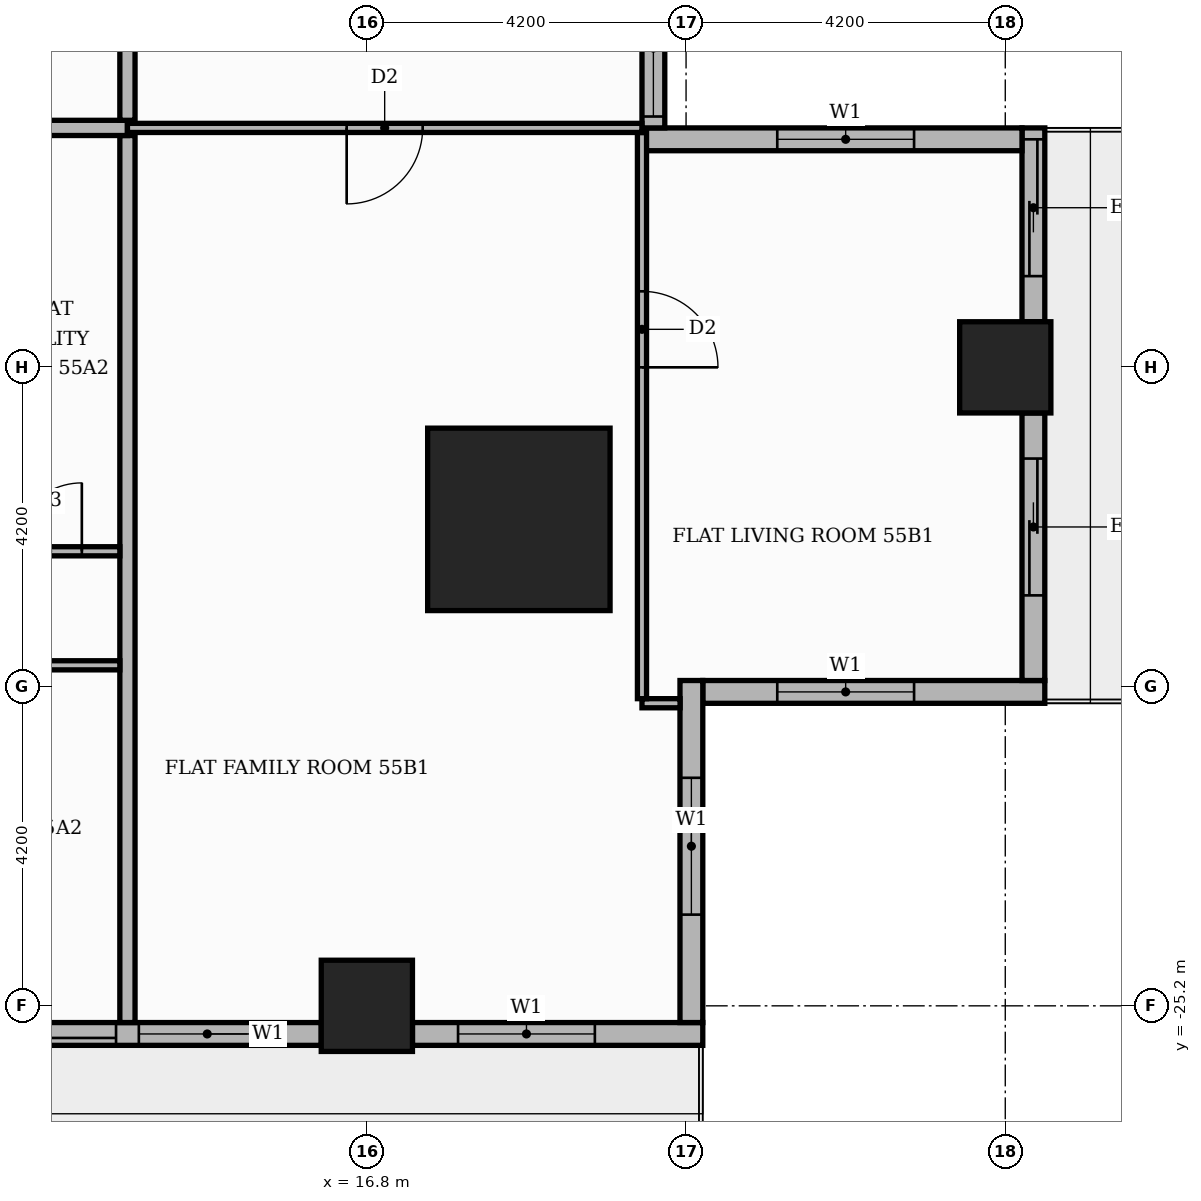
"""IFC4 building model, lengths in metres.
Left out: names, types, materials, properties, quantities, classifications, styles, units other than length and angle.
Written with IfcOpenShell. Run it as: python <this file> out.ifc"""

import sys

from ifc_helpers import new_model, si_unit, direction, frame, frame_2d, origin, origin_2d, place, context, subcontext, project, spatial, rectangle, extrude, element, fill, save


model = new_model("IFC4")
c1 = context("Model", 3, precision=1e-05, world=origin(), true_north=direction((0.0, 1.0)))
c2 = subcontext(c1, "Body", "Model", "MODEL_VIEW")
j1 = project(units=[si_unit("LENGTHUNIT", "METRE"), si_unit("PLANEANGLEUNIT", "RADIAN")], contexts=[c1])
p1 = place(None, origin())
s1 = spatial("IfcSite", under=j1, at=p1, CompositionType="ELEMENT")
p2 = place(p1, origin())
s2 = spatial("IfcBuilding", under=s1, at=p2, CompositionType="ELEMENT")
p3 = place(p2, frame((0.0, 0.0, 231.3)))
s3 = spatial("IfcBuildingStorey", under=s2, at=p3, CompositionType="ELEMENT", Elevation=231.3)
p4 = place(p3, frame((18.8, -18.8, 0.0), z_axis=(0.0, 0.0, 1.0), x_axis=(1.0, 0.0, 0.0)))
e1 = element("IfcColumn", 1, at=p4, inside=s3, PredefinedType="COLUMN", context=c2, shape_type="SweptSolid", body=[
    extrude(rectangle(XDim=2.4, YDim=2.4, at=origin_2d()), origin(), (0.0, 0.0, 1.0), 3.9),
])
for number, where, z_axis, x_axis in (
    (2, (25.2, -16.8, 0.0), (0.0, 0.0, 1.0), (1.0, 0.0, 0.0)),
    (3, (16.8, -25.2, 0.0), (0.0, 0.0, 1.0), (1.0, 0.0, 0.0)),
):
    element("IfcColumn", number, at=place(p3, frame(where, z_axis=z_axis, x_axis=x_axis)), inside=s3, PredefinedType="COLUMN", context=c2, shape_type="SweptSolid", body=[
        extrude(rectangle(XDim=1.2, YDim=1.2, at=origin_2d()), origin(), (0.0, 0.0, 1.0), 3.9),
    ])
p5 = place(p3, frame((21.22, -21.07, 0.0), z_axis=(0.0, 0.0, 1.0), x_axis=(1.0, 0.0, 0.0)))
e4 = element("IfcWall", 4, at=p5, inside=s3, PredefinedType="STANDARD", context=c2, shape_type="SweptSolid", body=[
    extrude(rectangle(XDim=4.5, YDim=0.3, at=frame_2d((2.25, 0.0))), origin(), (0.0, 0.0, 1.0), 3.4),
])
p6 = place(p5, frame((0.98, 0.0, 0.9)))
e5 = element("IfcOpeningElement", 5, at=p6, cuts=e4, PredefinedType="OPENING", context=c2, shape_type="SweptSolid", body=[
    extrude(rectangle(XDim=1.8, YDim=2.1, at=frame_2d((0.9, 1.05))), frame((0.0, 0.16, 0.0), z_axis=(0.0, -1.0, 0.0), x_axis=(1.0, 0.0, 0.0)), (0.0, 0.0, 1.0), 0.32),
])
p7 = place(p3, frame((25.57, -20.92, 0.0), z_axis=(0.0, 0.0, 1.0), x_axis=(0.0, 1.0, 0.0)))
e6 = element("IfcWall", 6, at=p7, inside=s3, PredefinedType="STANDARD", context=c2, shape_type="SweptSolid", body=[
    extrude(rectangle(XDim=3.52, YDim=0.3, at=frame_2d((1.76, 0.0))), origin(), (0.0, 0.0, 1.0), 3.4),
])
p8 = place(p7, frame((1.12, 0.0, 0.0)))
e7 = element("IfcOpeningElement", 7, at=p8, cuts=e6, PredefinedType="OPENING", context=c2, shape_type="SweptSolid", body=[
    extrude(rectangle(XDim=1.8, YDim=2.4, at=frame_2d((0.9, 1.2))), frame((0.0, 0.16, 0.0), z_axis=(0.0, -1.0, 0.0), x_axis=(1.0, 0.0, 0.0)), (0.0, 0.0, 1.0), 0.32),
])
p9 = place(p3, frame((25.57, -16.2, 0.0), z_axis=(0.0, 0.0, 1.0), x_axis=(0.0, 1.0, 0.0)))
e8 = element("IfcWall", 8, at=p9, inside=s3, PredefinedType="STANDARD", context=c2, shape_type="SweptSolid", body=[
    extrude(rectangle(XDim=2.55, YDim=0.3, at=frame_2d((1.275, 0.0))), origin(), (0.0, 0.0, 1.0), 3.4),
])
p10 = place(p9, frame((0.6, 0.0, 0.0)))
e9 = element("IfcOpeningElement", 9, at=p10, cuts=e8, PredefinedType="OPENING", context=c2, shape_type="SweptSolid", body=[
    extrude(rectangle(XDim=1.8, YDim=2.4, at=frame_2d((0.9, 1.2))), frame((0.0, 0.16, 0.0), z_axis=(0.0, -1.0, 0.0), x_axis=(1.0, 0.0, 0.0)), (0.0, 0.0, 1.0), 0.32),
])
p11 = place(p3, frame((25.42, -13.8, 0.0), z_axis=(0.0, 0.0, 1.0), x_axis=(-1.0, 0.0, 0.0)))
e10 = element("IfcWall", 10, at=p11, inside=s3, PredefinedType="STANDARD", context=c2, shape_type="SweptSolid", body=[
    extrude(rectangle(XDim=5.0, YDim=0.3, at=frame_2d((2.5, 0.0))), origin(), (0.0, 0.0, 1.0), 3.4),
])
p12 = place(p11, frame((1.42, 0.0, 0.9)))
e11 = element("IfcOpeningElement", 11, at=p12, cuts=e10, PredefinedType="OPENING", context=c2, shape_type="SweptSolid", body=[
    extrude(rectangle(XDim=1.8, YDim=2.1, at=frame_2d((0.9, 1.05))), frame((0.0, 0.16, 0.0), z_axis=(0.0, -1.0, 0.0), x_axis=(1.0, 0.0, 0.0)), (0.0, 0.0, 1.0), 0.32),
])
p13 = place(p3, frame((20.57, -13.65, 0.0), z_axis=(0.0, 0.0, 1.0), x_axis=(0.0, 1.0, 0.0)))
e12 = element("IfcWall", 12, at=p13, inside=s3, PredefinedType="STANDARD", context=c2, shape_type="SweptSolid", body=[
    extrude(rectangle(XDim=27.6, YDim=0.3, at=frame_2d((13.8, 0.0))), origin(), (0.0, 0.0, 1.0), 3.4),
])
p14 = place(p13, frame((0.15, 0.0, 0.9)))
e13 = element("IfcOpeningElement", 13, at=p14, cuts=e12, PredefinedType="OPENING", context=c2, shape_type="SweptSolid", body=[
    extrude(rectangle(XDim=1.8, YDim=2.1, at=frame_2d((0.9, 1.05))), frame((0.0, 0.16, 0.0), z_axis=(0.0, -1.0, 0.0), x_axis=(1.0, 0.0, 0.0)), (0.0, 0.0, 1.0), 0.32),
])
p15 = place(p13, frame((2.25, 0.0, 0.9)))
e14 = element("IfcOpeningElement", 14, at=p15, cuts=e12, PredefinedType="OPENING", context=c2, shape_type="SweptSolid", body=[
    extrude(rectangle(XDim=6.0, YDim=2.1, at=frame_2d((3.0, 1.05))), frame((0.0, 0.16, 0.0), z_axis=(0.0, -1.0, 0.0), x_axis=(1.0, 0.0, 0.0)), (0.0, 0.0, 1.0), 0.32),
])
p16 = place(p13, frame((8.55, 0.0, 0.9)))
e15 = element("IfcOpeningElement", 15, at=p16, cuts=e12, PredefinedType="OPENING", context=c2, shape_type="SweptSolid", body=[
    extrude(rectangle(XDim=6.0, YDim=2.1, at=frame_2d((3.0, 1.05))), frame((0.0, 0.16, 0.0), z_axis=(0.0, -1.0, 0.0), x_axis=(1.0, 0.0, 0.0)), (0.0, 0.0, 1.0), 0.32),
])
p17 = place(p13, frame((14.85, 0.0, 0.9)))
e16 = element("IfcOpeningElement", 16, at=p17, cuts=e12, PredefinedType="OPENING", context=c2, shape_type="SweptSolid", body=[
    extrude(rectangle(XDim=6.0, YDim=2.1, at=frame_2d((3.0, 1.05))), frame((0.0, 0.16, 0.0), z_axis=(0.0, -1.0, 0.0), x_axis=(1.0, 0.0, 0.0)), (0.0, 0.0, 1.0), 0.32),
])
p18 = place(p13, frame((21.15, 0.0, 0.9)))
e17 = element("IfcOpeningElement", 17, at=p18, cuts=e12, PredefinedType="OPENING", context=c2, shape_type="SweptSolid", body=[
    extrude(rectangle(XDim=6.0, YDim=2.1, at=frame_2d((3.0, 1.05))), frame((0.0, 0.16, 0.0), z_axis=(0.0, -1.0, 0.0), x_axis=(1.0, 0.0, 0.0)), (0.0, 0.0, 1.0), 0.32),
])
p19 = place(p3, frame((9.0, -25.57, 0.0), z_axis=(0.0, 0.0, 1.0), x_axis=(1.0, 0.0, 0.0)))
e18 = element("IfcWall", 18, at=p19, inside=s3, PredefinedType="STANDARD", context=c2, shape_type="SweptSolid", body=[
    extrude(rectangle(XDim=7.2, YDim=0.3, at=frame_2d((3.6, 0.0))), origin(), (0.0, 0.0, 1.0), 3.4),
])
p20 = place(p19, frame((0.6, 0.0, 0.0)))
e19 = element("IfcOpeningElement", 19, at=p20, cuts=e18, PredefinedType="OPENING", context=c2, shape_type="SweptSolid", body=[
    extrude(rectangle(XDim=3.9, YDim=2.4, at=frame_2d((1.95, 1.2))), frame((0.0, 0.16, 0.0), z_axis=(0.0, -1.0, 0.0), x_axis=(1.0, 0.0, 0.0)), (0.0, 0.0, 1.0), 0.32),
])
p21 = place(p19, frame((4.8, 0.0, 0.9)))
e20 = element("IfcOpeningElement", 20, at=p21, cuts=e18, PredefinedType="OPENING", context=c2, shape_type="SweptSolid", body=[
    extrude(rectangle(XDim=1.8, YDim=2.1, at=frame_2d((0.9, 1.05))), frame((0.0, 0.16, 0.0), z_axis=(0.0, -1.0, 0.0), x_axis=(1.0, 0.0, 0.0)), (0.0, 0.0, 1.0), 0.32),
])
p22 = place(p3, frame((17.4, -25.57, 0.0), z_axis=(0.0, 0.0, 1.0), x_axis=(1.0, 0.0, 0.0)))
e21 = element("IfcWall", 21, at=p22, inside=s3, PredefinedType="STANDARD", context=c2, shape_type="SweptSolid", body=[
    extrude(rectangle(XDim=3.82, YDim=0.3, at=frame_2d((1.91, 0.0))), origin(), (0.0, 0.0, 1.0), 3.4),
])
p23 = place(p22, frame((0.6, 0.0, 0.9)))
e22 = element("IfcOpeningElement", 22, at=p23, cuts=e21, PredefinedType="OPENING", context=c2, shape_type="SweptSolid", body=[
    extrude(rectangle(XDim=1.8, YDim=2.1, at=frame_2d((0.9, 1.05))), frame((0.0, 0.16, 0.0), z_axis=(0.0, -1.0, 0.0), x_axis=(1.0, 0.0, 0.0)), (0.0, 0.0, 1.0), 0.32),
])
p24 = place(p3, frame((21.07, -25.42, 0.0), z_axis=(0.0, 0.0, 1.0), x_axis=(0.0, 1.0, 0.0)))
e23 = element("IfcWall", 23, at=p24, inside=s3, PredefinedType="STANDARD", context=c2, shape_type="SweptSolid", body=[
    extrude(rectangle(XDim=4.5, YDim=0.3, at=frame_2d((2.25, 0.0))), origin(), (0.0, 0.0, 1.0), 3.4),
])
p25 = place(p24, frame((1.42, 0.0, 0.9)))
e24 = element("IfcOpeningElement", 24, at=p25, cuts=e23, PredefinedType="OPENING", context=c2, shape_type="SweptSolid", body=[
    extrude(rectangle(XDim=1.8, YDim=2.1, at=frame_2d((0.9, 1.05))), frame((0.0, 0.16, 0.0), z_axis=(0.0, -1.0, 0.0), x_axis=(1.0, 0.0, 0.0)), (0.0, 0.0, 1.0), 0.32),
])
p26 = place(p3, frame((13.65, -25.42, 0.0), z_axis=(0.0, 0.0, 1.0), x_axis=(0.0, 1.0, 0.0)))
e25 = element("IfcWall", 25, at=p26, inside=s3, PredefinedType="PARTITIONING", context=c2, shape_type="SweptSolid", body=[
    extrude(rectangle(XDim=11.67, YDim=0.2, at=frame_2d((5.835, 0.0))), origin(), (0.0, 0.0, 1.0), 3.4),
])
p27 = place(p3, frame((20.42, -21.219, 0.0), z_axis=(0.0, 0.0, 1.0), x_axis=(1.0, 0.0, 0.0)))
e26 = element("IfcWall", 26, at=p27, inside=s3, PredefinedType="PARTITIONING", context=c2, shape_type="SweptSolid", body=[
    extrude(rectangle(XDim=0.501, YDim=0.12, at=frame_2d((0.25, 0.0))), origin(), (0.0, 0.0, 1.0), 3.4),
])
p28 = place(p3, frame((20.42, -21.159, 0.0), z_axis=(0.0, 0.0, 1.0), x_axis=(0.0, 1.0, 0.0)))
e27 = element("IfcWall", 27, at=p28, inside=s3, PredefinedType="PARTITIONING", context=c2, shape_type="SweptSolid", body=[
    extrude(rectangle(XDim=7.448, YDim=0.12, at=frame_2d((3.724, 0.0))), origin(), (0.0, 0.0, 1.0), 3.4),
])
p29 = place(p28, frame((4.359, 0.0, 0.0)))
e28 = element("IfcOpeningElement", 28, at=p29, cuts=e27, PredefinedType="OPENING", context=c2, shape_type="SweptSolid", body=[
    extrude(rectangle(XDim=1.0, YDim=2.1, at=frame_2d((0.5, 1.05))), frame((0.0, 0.07, 0.0), z_axis=(0.0, -1.0, 0.0), x_axis=(1.0, 0.0, 0.0)), (0.0, 0.0, 1.0), 0.14),
])
p30 = place(p3, frame((-5.15, -20.72, 0.0), z_axis=(0.0, 0.0, 1.0), x_axis=(1.0, 0.0, 0.0)))
e29 = element("IfcWall", 29, at=p30, inside=s3, PredefinedType="PARTITIONING", context=c2, shape_type="SweptSolid", body=[
    extrude(rectangle(XDim=18.7, YDim=0.12, at=frame_2d((9.35, 0.0))), origin(), (0.0, 0.0, 1.0), 3.4),
])
p31 = place(p30, frame((3.65, 0.0, 0.0)))
e30 = element("IfcOpeningElement", 30, at=p31, cuts=e29, PredefinedType="OPENING", context=c2, shape_type="SweptSolid", body=[
    extrude(rectangle(XDim=0.9, YDim=2.1, at=frame_2d((0.45, 1.05))), frame((0.0, 0.07, 0.0), z_axis=(0.0, -1.0, 0.0), x_axis=(1.0, 0.0, 0.0)), (0.0, 0.0, 1.0), 0.14),
])
p32 = place(p30, frame((15.15, 0.0, 0.0)))
e31 = element("IfcOpeningElement", 31, at=p32, cuts=e29, PredefinedType="OPENING", context=c2, shape_type="SweptSolid", body=[
    extrude(rectangle(XDim=1.0, YDim=2.1, at=frame_2d((0.5, 1.05))), frame((0.0, 0.07, 0.0), z_axis=(0.0, -1.0, 0.0), x_axis=(1.0, 0.0, 0.0)), (0.0, 0.0, 1.0), 0.14),
])
p33 = place(p3, frame((-1.05, -19.22, 0.0), z_axis=(0.0, 0.0, 1.0), x_axis=(1.0, 0.0, 0.0)))
e32 = element("IfcWall", 32, at=p33, inside=s3, PredefinedType="PARTITIONING", context=c2, shape_type="SweptSolid", body=[
    extrude(rectangle(XDim=14.6, YDim=0.12, at=frame_2d((7.3, 0.0))), origin(), (0.0, 0.0, 1.0), 3.4),
])
p34 = place(p33, frame((2.7, 0.0, 0.0)))
e33 = element("IfcOpeningElement", 33, at=p34, cuts=e32, PredefinedType="OPENING", context=c2, shape_type="SweptSolid", body=[
    extrude(rectangle(XDim=0.9, YDim=2.1, at=frame_2d((0.45, 1.05))), frame((0.0, 0.07, 0.0), z_axis=(0.0, -1.0, 0.0), x_axis=(1.0, 0.0, 0.0)), (0.0, 0.0, 1.0), 0.14),
])
p35 = place(p33, frame((6.9, 0.0, 0.0)))
e34 = element("IfcOpeningElement", 34, at=p35, cuts=e32, PredefinedType="OPENING", context=c2, shape_type="SweptSolid", body=[
    extrude(rectangle(XDim=0.9, YDim=2.1, at=frame_2d((0.45, 1.05))), frame((0.0, 0.07, 0.0), z_axis=(0.0, -1.0, 0.0), x_axis=(1.0, 0.0, 0.0)), (0.0, 0.0, 1.0), 0.14),
])
p36 = place(p33, frame((10.05, 0.0, 0.0)))
e35 = element("IfcOpeningElement", 35, at=p36, cuts=e32, PredefinedType="OPENING", context=c2, shape_type="SweptSolid", body=[
    extrude(rectangle(XDim=0.9, YDim=2.1, at=frame_2d((0.45, 1.05))), frame((0.0, 0.07, 0.0), z_axis=(0.0, -1.0, 0.0), x_axis=(1.0, 0.0, 0.0)), (0.0, 0.0, 1.0), 0.14),
])
p37 = place(p33, frame((13.2, 0.0, 0.0)))
e36 = element("IfcOpeningElement", 36, at=p37, cuts=e32, PredefinedType="OPENING", context=c2, shape_type="SweptSolid", body=[
    extrude(rectangle(XDim=0.9, YDim=2.1, at=frame_2d((0.45, 1.05))), frame((0.0, 0.07, 0.0), z_axis=(0.0, -1.0, 0.0), x_axis=(1.0, 0.0, 0.0)), (0.0, 0.0, 1.0), 0.14),
])
p38 = place(p3, frame((-25.42, -13.65, 0.0), z_axis=(0.0, 0.0, 1.0), x_axis=(1.0, 0.0, 0.0)))
e37 = element("IfcWall", 37, at=p38, inside=s3, PredefinedType="PARTITIONING", context=c2, shape_type="SweptSolid", body=[
    extrude(rectangle(XDim=39.07, YDim=0.2, at=frame_2d((19.535, 0.0))), origin(), (0.0, 0.0, 1.0), 3.4),
])
p39 = place(p38, frame((13.32, 0.0, 0.0)))
e38 = element("IfcOpeningElement", 38, at=p39, cuts=e37, PredefinedType="OPENING", context=c2, shape_type="SweptSolid", body=[
    extrude(rectangle(XDim=1.1, YDim=2.4, at=frame_2d((0.55, 1.2))), frame((0.0, 0.11, 0.0), z_axis=(0.0, -1.0, 0.0), x_axis=(1.0, 0.0, 0.0)), (0.0, 0.0, 1.0), 0.22),
])
p40 = place(p38, frame((21.72, 0.0, 0.0)))
e39 = element("IfcOpeningElement", 39, at=p40, cuts=e37, PredefinedType="OPENING", context=c2, shape_type="SweptSolid", body=[
    extrude(rectangle(XDim=1.1, YDim=2.4, at=frame_2d((0.55, 1.2))), frame((0.0, 0.11, 0.0), z_axis=(0.0, -1.0, 0.0), x_axis=(1.0, 0.0, 0.0)), (0.0, 0.0, 1.0), 0.22),
])
p41 = place(p3, frame((13.65, -13.65, 0.0), z_axis=(0.0, 0.0, 1.0), x_axis=(1.0, 0.0, 0.0)))
e40 = element("IfcWall", 40, at=p41, inside=s3, PredefinedType="PARTITIONING", context=c2, shape_type="SweptSolid", body=[
    extrude(rectangle(XDim=6.769, YDim=0.12, at=frame_2d((3.385, 0.0))), origin(), (0.0, 0.0, 1.0), 3.4),
])
p42 = place(p41, frame((2.885, 0.0, 0.0)))
e41 = element("IfcOpeningElement", 41, at=p42, cuts=e40, PredefinedType="OPENING", context=c2, shape_type="SweptSolid", body=[
    extrude(rectangle(XDim=1.0, YDim=2.1, at=frame_2d((0.5, 1.05))), frame((0.0, 0.07, 0.0), z_axis=(0.0, -1.0, 0.0), x_axis=(1.0, 0.0, 0.0)), (0.0, 0.0, 1.0), 0.14),
])
p43 = place(p3, frame((13.65, -13.55, 0.0), z_axis=(0.0, 0.0, 1.0), x_axis=(0.0, 1.0, 0.0)))
e42 = element("IfcWall", 42, at=p43, inside=s3, PredefinedType="PARTITIONING", context=c2, shape_type="SweptSolid", body=[
    extrude(rectangle(XDim=2.45, YDim=0.2, at=frame_2d((1.225, 0.0))), origin(), (0.0, 0.0, 1.0), 3.4),
])
p44 = place(p6, origin())
e43 = element("IfcWindow", 43, at=p44, inside=s3, PartitioningType="SINGLE_PANEL", PredefinedType="WINDOW", context=c2, shape_type="SweptSolid", body=[
    extrude(rectangle(XDim=1.8, YDim=2.1, at=frame_2d((0.9, 1.05))), frame((0.0, 0.03, 0.0), z_axis=(0.0, -1.0, 0.0), x_axis=(1.0, 0.0, 0.0)), (0.0, 0.0, 1.0), 0.06),
])
fill(e5, e43)
p45 = place(p8, origin())
e44 = element("IfcDoor", 44, at=p45, inside=s3, OperationType="SLIDING_TO_RIGHT", PredefinedType="DOOR", context=c2, shape_type="SweptSolid", body=[
    extrude(rectangle(XDim=1.8, YDim=2.4, at=frame_2d((0.9, 1.2))), frame((0.0, 0.025, 0.0), z_axis=(0.0, -1.0, 0.0), x_axis=(1.0, 0.0, 0.0)), (0.0, 0.0, 1.0), 0.05),
])
fill(e7, e44)
p46 = place(p10, origin())
e45 = element("IfcDoor", 45, at=p46, inside=s3, OperationType="SLIDING_TO_LEFT", PredefinedType="DOOR", context=c2, shape_type="SweptSolid", body=[
    extrude(rectangle(XDim=1.8, YDim=2.4, at=frame_2d((0.9, 1.2))), frame((0.0, 0.025, 0.0), z_axis=(0.0, -1.0, 0.0), x_axis=(1.0, 0.0, 0.0)), (0.0, 0.0, 1.0), 0.05),
])
fill(e9, e45)
p47 = place(p12, origin())
e46 = element("IfcWindow", 46, at=p47, inside=s3, PartitioningType="SINGLE_PANEL", PredefinedType="WINDOW", context=c2, shape_type="SweptSolid", body=[
    extrude(rectangle(XDim=1.8, YDim=2.1, at=frame_2d((0.9, 1.05))), frame((0.0, 0.03, 0.0), z_axis=(0.0, -1.0, 0.0), x_axis=(1.0, 0.0, 0.0)), (0.0, 0.0, 1.0), 0.06),
])
fill(e11, e46)
p48 = place(p14, origin())
e47 = element("IfcWindow", 47, at=p48, inside=s3, PartitioningType="SINGLE_PANEL", PredefinedType="WINDOW", context=c2, shape_type="SweptSolid", body=[
    extrude(rectangle(XDim=1.8, YDim=2.1, at=frame_2d((0.9, 1.05))), frame((0.0, 0.03, 0.0), z_axis=(0.0, -1.0, 0.0), x_axis=(1.0, 0.0, 0.0)), (0.0, 0.0, 1.0), 0.06),
])
fill(e13, e47)
p49 = place(p20, origin())
e48 = element("IfcDoor", 48, at=p49, inside=s3, OperationType="SLIDING_TO_LEFT", PredefinedType="DOOR", context=c2, shape_type="SweptSolid", body=[
    extrude(rectangle(XDim=3.9, YDim=2.4, at=frame_2d((1.95, 1.2))), frame((0.0, 0.025, 0.0), z_axis=(0.0, -1.0, 0.0), x_axis=(1.0, 0.0, 0.0)), (0.0, 0.0, 1.0), 0.05),
])
fill(e19, e48)
p50 = place(p21, origin())
e49 = element("IfcWindow", 49, at=p50, inside=s3, PartitioningType="SINGLE_PANEL", PredefinedType="WINDOW", context=c2, shape_type="SweptSolid", body=[
    extrude(rectangle(XDim=1.8, YDim=2.1, at=frame_2d((0.9, 1.05))), frame((0.0, 0.03, 0.0), z_axis=(0.0, -1.0, 0.0), x_axis=(1.0, 0.0, 0.0)), (0.0, 0.0, 1.0), 0.06),
])
fill(e20, e49)
p51 = place(p23, origin())
e50 = element("IfcWindow", 50, at=p51, inside=s3, PartitioningType="SINGLE_PANEL", PredefinedType="WINDOW", context=c2, shape_type="SweptSolid", body=[
    extrude(rectangle(XDim=1.8, YDim=2.1, at=frame_2d((0.9, 1.05))), frame((0.0, 0.03, 0.0), z_axis=(0.0, -1.0, 0.0), x_axis=(1.0, 0.0, 0.0)), (0.0, 0.0, 1.0), 0.06),
])
fill(e22, e50)
p52 = place(p25, origin())
e51 = element("IfcWindow", 51, at=p52, inside=s3, PartitioningType="SINGLE_PANEL", PredefinedType="WINDOW", context=c2, shape_type="SweptSolid", body=[
    extrude(rectangle(XDim=1.8, YDim=2.1, at=frame_2d((0.9, 1.05))), frame((0.0, 0.03, 0.0), z_axis=(0.0, -1.0, 0.0), x_axis=(1.0, 0.0, 0.0)), (0.0, 0.0, 1.0), 0.06),
])
fill(e24, e51)
p53 = place(p37, origin())
e52 = element("IfcDoor", 52, at=p53, inside=s3, OperationType="SINGLE_SWING_RIGHT", PredefinedType="DOOR", context=c2, shape_type="SweptSolid", body=[
    extrude(rectangle(XDim=0.9, YDim=2.1, at=frame_2d((0.45, 1.05))), frame((0.0, 0.025, 0.0), z_axis=(0.0, -1.0, 0.0), x_axis=(1.0, 0.0, 0.0)), (0.0, 0.0, 1.0), 0.05),
])
fill(e36, e52)
p54 = place(p42, frame((1.0, 0.0, 0.0), z_axis=(0.0, 0.0, 1.0), x_axis=(-1.0, 0.0, 0.0)))
e53 = element("IfcDoor", 53, at=p54, inside=s3, OperationType="SINGLE_SWING_LEFT", PredefinedType="DOOR", context=c2, shape_type="SweptSolid", body=[
    extrude(rectangle(XDim=1.0, YDim=2.1, at=frame_2d((0.5, 1.05))), frame((0.0, 0.025, 0.0), z_axis=(0.0, -1.0, 0.0), x_axis=(1.0, 0.0, 0.0)), (0.0, 0.0, 1.0), 0.05),
])
fill(e41, e53)
p55 = place(p29, frame((1.0, 0.0, 0.0), z_axis=(0.0, 0.0, 1.0), x_axis=(-1.0, 0.0, 0.0)))
e54 = element("IfcDoor", 54, at=p55, inside=s3, OperationType="SINGLE_SWING_LEFT", PredefinedType="DOOR", context=c2, shape_type="SweptSolid", body=[
    extrude(rectangle(XDim=1.0, YDim=2.1, at=frame_2d((0.5, 1.05))), frame((0.0, 0.025, 0.0), z_axis=(0.0, -1.0, 0.0), x_axis=(1.0, 0.0, 0.0)), (0.0, 0.0, 1.0), 0.05),
])
fill(e28, e54)
save(model, sys.argv[1])
